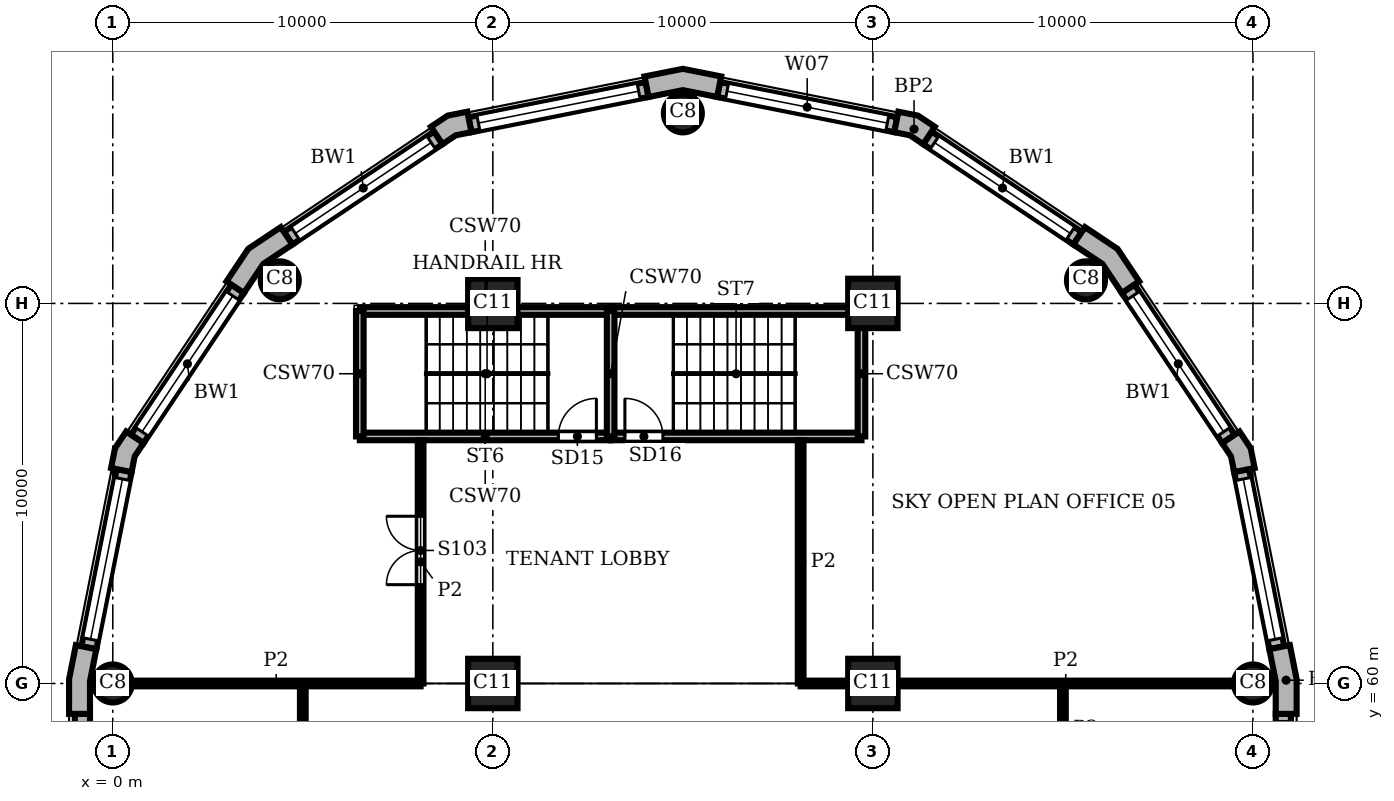
"""IFC4 building model, lengths in metres.
Left out: names, types, materials, properties, quantities, classifications, styles, units other than length and angle.
Written with IfcOpenShell. Run it as: python <this file> out.ifc"""

import sys

from ifc_helpers import new_model, si_unit, direction, frame, frame_2d, origin, origin_2d, place, context, subcontext, project, spatial, polyline, rectangle, circle, outline, extrude, element, fill, save


model = new_model("IFC4")
c1 = context("Model", 3, precision=1e-05, world=origin(), true_north=direction((0.0, 1.0)))
c2 = subcontext(c1, "Body", "Model", "MODEL_VIEW")
j1 = project(units=[si_unit("LENGTHUNIT", "METRE"), si_unit("PLANEANGLEUNIT", "RADIAN")], contexts=[c1])
p1 = place(None, origin())
s1 = spatial("IfcSite", under=j1, at=p1, CompositionType="ELEMENT")
p2 = place(p1, origin())
s2 = spatial("IfcBuilding", under=s1, at=p2, CompositionType="ELEMENT")
p3 = place(p2, frame((0.0, 0.0, 126.3)))
s3 = spatial("IfcBuildingStorey", under=s2, at=p3, CompositionType="ELEMENT", Elevation=126.3)
for number, where, z_axis, x_axis in (
    (1, (30.0, 60.0, 0.0), (0.0, 0.0, 1.0), (1.0, 0.0, 0.0)),
    (2, (25.607, 70.607, 0.0), (0.0, 0.0, 1.0), (1.0, 0.0, 0.0)),
    (3, (15.0, 75.0, 0.0), (0.0, 0.0, 1.0), (1.0, 0.0, 0.0)),
    (4, (4.393, 70.607, 0.0), (0.0, 0.0, 1.0), (1.0, 0.0, 0.0)),
    (5, (0.0, 60.0, 0.0), (0.0, 0.0, 1.0), (1.0, 0.0, 0.0)),
):
    element("IfcColumn", number, at=place(p3, frame(where, z_axis=z_axis, x_axis=x_axis)), inside=s3, PredefinedType="COLUMN", context=c2, shape_type="SweptSolid", body=[
        extrude(circle(Radius=0.5, at=origin_2d()), origin(), (0.0, 0.0, 1.0), 5.4),
    ])
for number, where, z_axis, x_axis in (
    (6, (10.0, 60.0, 0.0), (0.0, 0.0, 1.0), (1.0, 0.0, 0.0)),
    (7, (10.0, 70.0, 0.0), (0.0, 0.0, 1.0), (1.0, 0.0, 0.0)),
    (8, (20.0, 60.0, 0.0), (0.0, 0.0, 1.0), (1.0, 0.0, 0.0)),
    (9, (20.0, 70.0, 0.0), (0.0, 0.0, 1.0), (1.0, 0.0, 0.0)),
):
    element("IfcColumn", number, at=place(p3, frame(where, z_axis=z_axis, x_axis=x_axis)), inside=s3, PredefinedType="COLUMN", context=c2, shape_type="SweptSolid", body=[
        extrude(rectangle(XDim=1.3, YDim=1.3, at=origin_2d()), origin(), (0.0, 0.0, 1.0), 5.4),
    ])
p4 = place(p3, origin())
e10 = element("IfcWall", 10, at=p4, inside=s3, PredefinedType="SOLIDWALL", context=c2, shape_type="SweptSolid", body=[
    extrude(outline(polyline([(31.0, 59.2), (31.15, 59.2), (31.15, 60.113), (30.972, 61.009), (30.825, 60.98), (30.432, 60.902), (30.6, 60.059), (30.6, 59.2), (31.0, 59.2)])), origin(), (0.0, 0.0, 1.0), 5.4),
])
e11 = element("IfcWall", 11, at=p4, inside=s3, PredefinedType="SOLIDWALL", context=c2, shape_type="SweptSolid", body=[
    extrude(outline(polyline([(29.897, 65.641), (30.045, 65.67), (29.941, 66.189), (29.648, 66.629), (29.523, 66.545), (29.19, 66.323), (29.423, 65.974), (29.505, 65.563), (29.897, 65.641)])), origin(), (0.0, 0.0, 1.0), 5.4),
])
e12 = element("IfcWall", 12, at=p4, inside=s3, PredefinedType="SOLIDWALL", context=c2, shape_type="SweptSolid", body=[
    extrude(outline(polyline([(26.883, 70.497), (27.007, 70.58), (26.436, 71.436), (25.58, 72.007), (25.497, 71.883), (25.275, 71.55), (26.039, 71.039), (26.55, 70.275), (26.883, 70.497)])), origin(), (0.0, 0.0, 1.0), 5.4),
])
e13 = element("IfcWall", 13, at=p4, inside=s3, PredefinedType="SOLIDWALL", context=c2, shape_type="SweptSolid", body=[
    extrude(outline(polyline([(21.545, 74.523), (21.629, 74.648), (21.189, 74.941), (20.67, 75.045), (20.641, 74.897), (20.563, 74.505), (20.974, 74.423), (21.323, 74.19), (21.545, 74.523)])), origin(), (0.0, 0.0, 1.0), 5.4),
])
e14 = element("IfcWall", 14, at=p4, inside=s3, PredefinedType="SOLIDWALL", context=c2, shape_type="SweptSolid", body=[
    extrude(outline(polyline([(15.98, 75.825), (16.009, 75.972), (15.0, 76.173), (13.991, 75.972), (14.02, 75.825), (14.098, 75.432), (15.0, 75.612), (15.902, 75.432), (15.98, 75.825)])), origin(), (0.0, 0.0, 1.0), 5.4),
])
e15 = element("IfcWall", 15, at=p4, inside=s3, PredefinedType="SOLIDWALL", context=c2, shape_type="SweptSolid", body=[
    extrude(outline(polyline([(9.359, 74.897), (9.33, 75.045), (8.811, 74.941), (8.371, 74.648), (8.455, 74.523), (8.677, 74.19), (9.026, 74.423), (9.437, 74.505), (9.359, 74.897)])), origin(), (0.0, 0.0, 1.0), 5.4),
])
e16 = element("IfcWall", 16, at=p4, inside=s3, PredefinedType="SOLIDWALL", context=c2, shape_type="SweptSolid", body=[
    extrude(outline(polyline([(4.503, 71.883), (4.42, 72.007), (3.564, 71.436), (2.993, 70.58), (3.117, 70.497), (3.45, 70.275), (3.961, 71.039), (4.725, 71.55), (4.503, 71.883)])), origin(), (0.0, 0.0, 1.0), 5.4),
])
e17 = element("IfcWall", 17, at=p4, inside=s3, PredefinedType="SOLIDWALL", context=c2, shape_type="SweptSolid", body=[
    extrude(outline(polyline([(0.477, 66.545), (0.352, 66.629), (0.059, 66.189), (-0.045, 65.67), (0.103, 65.641), (0.495, 65.563), (0.577, 65.974), (0.81, 66.323), (0.477, 66.545)])), origin(), (0.0, 0.0, 1.0), 5.4),
])
e18 = element("IfcWall", 18, at=p4, inside=s3, PredefinedType="SOLIDWALL", context=c2, shape_type="SweptSolid", body=[
    extrude(outline(polyline([(-0.825, 60.98), (-0.972, 61.009), (-1.15, 60.113), (-1.15, 59.2), (-1.0, 59.2), (-0.6, 59.2), (-0.6, 60.059), (-0.432, 60.902), (-0.825, 60.98)])), origin(), (0.0, 0.0, 1.0), 5.4),
])
p5 = place(p3, frame((30.8, 40.8, 0.0), z_axis=(0.0, 0.0, 1.0), x_axis=(0.0, 1.0, 0.0)))
e19 = element("IfcWall", 19, at=p5, inside=s3, PredefinedType="SOLIDWALL", context=c2, shape_type="SweptSolid", body=[
    extrude(rectangle(XDim=18.4, YDim=0.4, at=frame_2d((9.2, 0.0))), origin(), (0.0, 0.0, 1.0), 5.4),
])
p6 = place(p5, frame((0.2, 0.0, 0.9)))
e20 = element("IfcOpeningElement", 20, at=p6, cuts=e19, PredefinedType="OPENING", context=c2, shape_type="SweptSolid", body=[
    extrude(rectangle(XDim=8.0, YDim=3.4, at=frame_2d((4.0, 1.7))), frame((0.0, 0.21, 0.0), z_axis=(0.0, -1.0, 0.0), x_axis=(1.0, 0.0, 0.0)), (0.0, 0.0, 1.0), 0.42),
])
p7 = place(p5, frame((10.2, 0.0, 0.9)))
e21 = element("IfcOpeningElement", 21, at=p7, cuts=e19, PredefinedType="OPENING", context=c2, shape_type="SweptSolid", body=[
    extrude(rectangle(XDim=8.0, YDim=3.4, at=frame_2d((4.0, 1.7))), frame((0.0, 0.21, 0.0), z_axis=(0.0, -1.0, 0.0), x_axis=(1.0, 0.0, 0.0)), (0.0, 0.0, 1.0), 0.42),
])
p8 = place(p3, frame((30.629, 60.941, 0.0), z_axis=(0.0, 0.0, 1.0), x_axis=(-0.195098533057, 0.98078364709, 0.0)))
e22 = element("IfcWall", 22, at=p8, inside=s3, PredefinedType="SOLIDWALL", context=c2, shape_type="SweptSolid", body=[
    extrude(rectangle(XDim=4.753, YDim=0.4, at=frame_2d((2.376, 0.0))), origin(), (0.0, 0.0, 1.0), 5.4),
])
p9 = place(p8, frame((0.226, 0.0, 0.9)))
e23 = element("IfcOpeningElement", 23, at=p9, cuts=e22, PredefinedType="OPENING", context=c2, shape_type="SweptSolid", body=[
    extrude(rectangle(XDim=4.3, YDim=3.4, at=frame_2d((2.15, 1.7))), frame((0.0, 0.21, 0.0), z_axis=(0.0, -1.0, 0.0), x_axis=(1.0, 0.0, 0.0)), (0.0, 0.0, 1.0), 0.42),
])
p10 = place(p3, frame((29.357, 66.434, 0.0), z_axis=(0.0, 0.0, 1.0), x_axis=(-0.555541552266, 0.831488775454, 0.0)))
e24 = element("IfcWall", 24, at=p10, inside=s3, PredefinedType="SOLIDWALL", context=c2, shape_type="SweptSolid", body=[
    extrude(rectangle(XDim=4.753, YDim=0.4, at=frame_2d((2.376, 0.0))), origin(), (0.0, 0.0, 1.0), 5.4),
])
p11 = place(p10, frame((0.226, 0.0, 0.9)))
e25 = element("IfcOpeningElement", 25, at=p11, cuts=e24, PredefinedType="OPENING", context=c2, shape_type="SweptSolid", body=[
    extrude(rectangle(XDim=4.3, YDim=3.4, at=frame_2d((2.15, 1.7))), frame((0.0, 0.21, 0.0), z_axis=(0.0, -1.0, 0.0), x_axis=(1.0, 0.0, 0.0)), (0.0, 0.0, 1.0), 0.42),
])
p12 = place(p3, frame((25.386, 71.716, 0.0), z_axis=(0.0, 0.0, 1.0), x_axis=(-0.831488775454, 0.555541552266, 0.0)))
e26 = element("IfcWall", 26, at=p12, inside=s3, PredefinedType="SOLIDWALL", context=c2, shape_type="SweptSolid", body=[
    extrude(rectangle(XDim=4.753, YDim=0.4, at=frame_2d((2.376, 0.0))), origin(), (0.0, 0.0, 1.0), 5.4),
])
p13 = place(p12, frame((0.226, 0.0, 0.9)))
e27 = element("IfcOpeningElement", 27, at=p13, cuts=e26, PredefinedType="OPENING", context=c2, shape_type="SweptSolid", body=[
    extrude(rectangle(XDim=4.3, YDim=3.4, at=frame_2d((2.15, 1.7))), frame((0.0, 0.21, 0.0), z_axis=(0.0, -1.0, 0.0), x_axis=(1.0, 0.0, 0.0)), (0.0, 0.0, 1.0), 0.42),
])
p14 = place(p3, frame((20.602, 74.701, 0.0), z_axis=(0.0, 0.0, 1.0), x_axis=(-0.98078364709, 0.195098533057, 0.0)))
e28 = element("IfcWall", 28, at=p14, inside=s3, PredefinedType="SOLIDWALL", context=c2, shape_type="SweptSolid", body=[
    extrude(rectangle(XDim=4.753, YDim=0.4, at=frame_2d((2.376, 0.0))), origin(), (0.0, 0.0, 1.0), 5.4),
])
p15 = place(p14, frame((0.226, 0.0, 0.9)))
e29 = element("IfcOpeningElement", 29, at=p15, cuts=e28, PredefinedType="OPENING", context=c2, shape_type="SweptSolid", body=[
    extrude(rectangle(XDim=4.3, YDim=3.4, at=frame_2d((2.15, 1.7))), frame((0.0, 0.21, 0.0), z_axis=(0.0, -1.0, 0.0), x_axis=(1.0, 0.0, 0.0)), (0.0, 0.0, 1.0), 0.42),
])
p16 = place(p3, frame((14.059, 75.629, 0.0), z_axis=(0.0, 0.0, 1.0), x_axis=(-0.98078364709, -0.195098533057, 0.0)))
e30 = element("IfcWall", 30, at=p16, inside=s3, PredefinedType="SOLIDWALL", context=c2, shape_type="SweptSolid", body=[
    extrude(rectangle(XDim=4.753, YDim=0.4, at=frame_2d((2.376, 0.0))), origin(), (0.0, 0.0, 1.0), 5.4),
])
p17 = place(p16, frame((0.226, 0.0, 0.9)))
e31 = element("IfcOpeningElement", 31, at=p17, cuts=e30, PredefinedType="OPENING", context=c2, shape_type="SweptSolid", body=[
    extrude(rectangle(XDim=4.3, YDim=3.4, at=frame_2d((2.15, 1.7))), frame((0.0, 0.21, 0.0), z_axis=(0.0, -1.0, 0.0), x_axis=(1.0, 0.0, 0.0)), (0.0, 0.0, 1.0), 0.42),
])
p18 = place(p3, frame((8.566, 74.357, 0.0), z_axis=(0.0, 0.0, 1.0), x_axis=(-0.831488775454, -0.555541552266, 0.0)))
e32 = element("IfcWall", 32, at=p18, inside=s3, PredefinedType="SOLIDWALL", context=c2, shape_type="SweptSolid", body=[
    extrude(rectangle(XDim=4.753, YDim=0.4, at=frame_2d((2.376, 0.0))), origin(), (0.0, 0.0, 1.0), 5.4),
])
p19 = place(p18, frame((0.226, 0.0, 0.9)))
e33 = element("IfcOpeningElement", 33, at=p19, cuts=e32, PredefinedType="OPENING", context=c2, shape_type="SweptSolid", body=[
    extrude(rectangle(XDim=4.3, YDim=3.4, at=frame_2d((2.15, 1.7))), frame((0.0, 0.21, 0.0), z_axis=(0.0, -1.0, 0.0), x_axis=(1.0, 0.0, 0.0)), (0.0, 0.0, 1.0), 0.42),
])
p20 = place(p3, frame((3.284, 70.386, 0.0), z_axis=(0.0, 0.0, 1.0), x_axis=(-0.555541552266, -0.831488775454, 0.0)))
e34 = element("IfcWall", 34, at=p20, inside=s3, PredefinedType="SOLIDWALL", context=c2, shape_type="SweptSolid", body=[
    extrude(rectangle(XDim=4.753, YDim=0.4, at=frame_2d((2.376, 0.0))), origin(), (0.0, 0.0, 1.0), 5.4),
])
p21 = place(p20, frame((0.226, 0.0, 0.9)))
e35 = element("IfcOpeningElement", 35, at=p21, cuts=e34, PredefinedType="OPENING", context=c2, shape_type="SweptSolid", body=[
    extrude(rectangle(XDim=4.3, YDim=3.4, at=frame_2d((2.15, 1.7))), frame((0.0, 0.21, 0.0), z_axis=(0.0, -1.0, 0.0), x_axis=(1.0, 0.0, 0.0)), (0.0, 0.0, 1.0), 0.42),
])
p22 = place(p3, frame((0.299, 65.602, 0.0), z_axis=(0.0, 0.0, 1.0), x_axis=(-0.195098533057, -0.98078364709, 0.0)))
e36 = element("IfcWall", 36, at=p22, inside=s3, PredefinedType="SOLIDWALL", context=c2, shape_type="SweptSolid", body=[
    extrude(rectangle(XDim=4.753, YDim=0.4, at=frame_2d((2.376, 0.0))), origin(), (0.0, 0.0, 1.0), 5.4),
])
p23 = place(p22, frame((0.226, 0.0, 0.9)))
e37 = element("IfcOpeningElement", 37, at=p23, cuts=e36, PredefinedType="OPENING", context=c2, shape_type="SweptSolid", body=[
    extrude(rectangle(XDim=4.3, YDim=3.4, at=frame_2d((2.15, 1.7))), frame((0.0, 0.21, 0.0), z_axis=(0.0, -1.0, 0.0), x_axis=(1.0, 0.0, 0.0)), (0.0, 0.0, 1.0), 0.42),
])
p24 = place(p3, frame((-0.8, 59.2, 0.0), z_axis=(0.0, 0.0, 1.0), x_axis=(0.0, -1.0, 0.0)))
e38 = element("IfcWall", 38, at=p24, inside=s3, PredefinedType="SOLIDWALL", context=c2, shape_type="SweptSolid", body=[
    extrude(rectangle(XDim=18.4, YDim=0.4, at=frame_2d((9.2, 0.0))), origin(), (0.0, 0.0, 1.0), 5.4),
])
p25 = place(p24, frame((3.75, 0.0, 0.9)))
e39 = element("IfcOpeningElement", 39, at=p25, cuts=e38, PredefinedType="OPENING", context=c2, shape_type="SweptSolid", body=[
    extrude(rectangle(XDim=0.9, YDim=3.4, at=frame_2d((0.45, 1.7))), frame((0.0, 0.21, 0.0), z_axis=(0.0, -1.0, 0.0), x_axis=(1.0, 0.0, 0.0)), (0.0, 0.0, 1.0), 0.42),
])
p26 = place(p24, frame((13.75, 0.0, 0.9)))
e40 = element("IfcOpeningElement", 40, at=p26, cuts=e38, PredefinedType="OPENING", context=c2, shape_type="SweptSolid", body=[
    extrude(rectangle(XDim=0.9, YDim=3.4, at=frame_2d((0.45, 1.7))), frame((0.0, 0.21, 0.0), z_axis=(0.0, -1.0, 0.0), x_axis=(1.0, 0.0, 0.0)), (0.0, 0.0, 1.0), 0.42),
])
p27 = place(p3, frame((6.5, 66.5, 0.0), z_axis=(0.0, 0.0, 1.0), x_axis=(1.0, 0.0, 0.0)))
e41 = element("IfcWall", 41, at=p27, inside=s3, PredefinedType="SHEAR", context=c2, shape_type="SweptSolid", body=[
    extrude(rectangle(XDim=6.6, YDim=0.2, at=frame_2d((3.3, 0.0))), origin(), (0.0, 0.0, 1.0), 5.08),
])
p28 = place(p27, frame((5.225, 0.0, 0.0)))
e42 = element("IfcOpeningElement", 42, at=p28, cuts=e41, PredefinedType="OPENING", context=c2, shape_type="SweptSolid", body=[
    extrude(rectangle(XDim=1.0, YDim=2.1, at=frame_2d((0.5, 1.05))), frame((0.0, 0.11, 0.0), z_axis=(0.0, -1.0, 0.0), x_axis=(1.0, 0.0, 0.0)), (0.0, 0.0, 1.0), 0.22),
])
p29 = place(p3, frame((13.1, 66.5, 0.0), z_axis=(0.0, 0.0, 1.0), x_axis=(1.0, 0.0, 0.0)))
e43 = element("IfcWall", 43, at=p29, inside=s3, PredefinedType="SHEAR", context=c2, shape_type="SweptSolid", body=[
    extrude(rectangle(XDim=6.6, YDim=0.2, at=frame_2d((3.3, 0.0))), origin(), (0.0, 0.0, 1.0), 5.08),
])
p30 = place(p29, frame((0.375, 0.0, 0.0)))
e44 = element("IfcOpeningElement", 44, at=p30, cuts=e43, PredefinedType="OPENING", context=c2, shape_type="SweptSolid", body=[
    extrude(rectangle(XDim=1.0, YDim=2.1, at=frame_2d((0.5, 1.05))), frame((0.0, 0.11, 0.0), z_axis=(0.0, -1.0, 0.0), x_axis=(1.0, 0.0, 0.0)), (0.0, 0.0, 1.0), 0.22),
])
p31 = place(p3, frame((6.5, 69.8, 0.0), z_axis=(0.0, 0.0, 1.0), x_axis=(1.0, 0.0, 0.0)))
e45 = element("IfcWall", 45, at=p31, inside=s3, PredefinedType="SHEAR", context=c2, shape_type="SweptSolid", body=[
    extrude(rectangle(XDim=6.6, YDim=0.2, at=frame_2d((3.3, 0.0))), origin(), (0.0, 0.0, 1.0), 5.08),
])
p32 = place(p3, frame((13.1, 69.8, 0.0), z_axis=(0.0, 0.0, 1.0), x_axis=(1.0, 0.0, 0.0)))
e46 = element("IfcWall", 46, at=p32, inside=s3, PredefinedType="SHEAR", context=c2, shape_type="SweptSolid", body=[
    extrude(rectangle(XDim=6.6, YDim=0.2, at=frame_2d((3.3, 0.0))), origin(), (0.0, 0.0, 1.0), 5.08),
])
for number, where, z_axis, x_axis in (
    (47, (6.5, 66.5, 0.0), (0.0, 0.0, 1.0), (0.0, 1.0, 0.0)),
    (48, (13.1, 66.5, 0.0), (0.0, 0.0, 1.0), (0.0, 1.0, 0.0)),
    (49, (19.7, 66.5, 0.0), (0.0, 0.0, 1.0), (0.0, 1.0, 0.0)),
):
    element("IfcWall", number, at=place(p3, frame(where, z_axis=z_axis, x_axis=x_axis)), inside=s3, PredefinedType="SHEAR", context=c2, shape_type="SweptSolid", body=[
        extrude(rectangle(XDim=3.3, YDim=0.2, at=frame_2d((1.65, 0.0))), origin(), (0.0, 0.0, 1.0), 5.08),
    ])
p33 = place(p3, frame((5.0, 57.6, 0.0), z_axis=(0.0, 0.0, 1.0), x_axis=(0.0, 1.0, 0.0)))
e50 = element("IfcWall", 50, at=p33, inside=s3, PredefinedType="PARTITIONING", context=c2, shape_type="SweptSolid", body=[
    extrude(rectangle(XDim=2.4, YDim=0.15, at=frame_2d((1.2, 0.0))), origin(), (0.0, 0.0, 1.0), 5.08),
])
p34 = place(p3, frame((8.1, 60.0, 0.0), z_axis=(0.0, 0.0, 1.0), x_axis=(0.0, 1.0, 0.0)))
e51 = element("IfcWall", 51, at=p34, inside=s3, PredefinedType="PARTITIONING", context=c2, shape_type="SweptSolid", body=[
    extrude(rectangle(XDim=6.4, YDim=0.15, at=frame_2d((3.2, 0.0))), origin(), (0.0, 0.0, 1.0), 5.08),
])
p35 = place(p34, frame((2.6, 0.0, 0.0)))
e52 = element("IfcOpeningElement", 52, at=p35, cuts=e51, PredefinedType="OPENING", context=c2, shape_type="SweptSolid", body=[
    extrude(rectangle(XDim=1.8, YDim=2.1, at=frame_2d((0.9, 1.05))), frame((0.0, 0.085, 0.0), z_axis=(0.0, -1.0, 0.0), x_axis=(1.0, 0.0, 0.0)), (0.0, 0.0, 1.0), 0.17),
])
p36 = place(p3, frame((18.1, 60.0, 0.0), z_axis=(0.0, 0.0, 1.0), x_axis=(0.0, 1.0, 0.0)))
e53 = element("IfcWall", 53, at=p36, inside=s3, PredefinedType="PARTITIONING", context=c2, shape_type="SweptSolid", body=[
    extrude(rectangle(XDim=6.4, YDim=0.15, at=frame_2d((3.2, 0.0))), origin(), (0.0, 0.0, 1.0), 5.08),
])
p37 = place(p3, frame((25.0, 57.6, 0.0), z_axis=(0.0, 0.0, 1.0), x_axis=(0.0, 1.0, 0.0)))
e54 = element("IfcWall", 54, at=p37, inside=s3, PredefinedType="PARTITIONING", context=c2, shape_type="SweptSolid", body=[
    extrude(rectangle(XDim=2.4, YDim=0.15, at=frame_2d((1.2, 0.0))), origin(), (0.0, 0.0, 1.0), 5.08),
])
p38 = place(p3, frame((0.5, 60.0, 0.0), z_axis=(0.0, 0.0, 1.0), x_axis=(1.0, 0.0, 0.0)))
e55 = element("IfcWall", 55, at=p38, inside=s3, PredefinedType="PARTITIONING", context=c2, shape_type="SweptSolid", body=[
    extrude(rectangle(XDim=7.6, YDim=0.15, at=frame_2d((3.8, 0.0))), origin(), (0.0, 0.0, 1.0), 5.08),
])
p39 = place(p3, frame((18.1, 60.0, 0.0), z_axis=(0.0, 0.0, 1.0), x_axis=(1.0, 0.0, 0.0)))
e56 = element("IfcWall", 56, at=p39, inside=s3, PredefinedType="PARTITIONING", context=c2, shape_type="SweptSolid", body=[
    extrude(rectangle(XDim=1.25, YDim=0.15, at=frame_2d((0.625, 0.0))), origin(), (0.0, 0.0, 1.0), 5.08),
])
p40 = place(p3, frame((20.65, 60.0, 0.0), z_axis=(0.0, 0.0, 1.0), x_axis=(1.0, 0.0, 0.0)))
e57 = element("IfcWall", 57, at=p40, inside=s3, PredefinedType="PARTITIONING", context=c2, shape_type="SweptSolid", body=[
    extrude(rectangle(XDim=8.85, YDim=0.15, at=frame_2d((4.425, 0.0))), origin(), (0.0, 0.0, 1.0), 5.08),
])
p41 = place(p9, origin())
e58 = element("IfcWindow", 58, at=p41, inside=s3, PartitioningType="SINGLE_PANEL", PredefinedType="WINDOW", context=c2, shape_type="SweptSolid", body=[
    extrude(rectangle(XDim=4.3, YDim=3.4, at=frame_2d((2.15, 1.7))), frame((0.0, 0.16, 0.0), z_axis=(0.0, -1.0, 0.0), x_axis=(1.0, 0.0, 0.0)), (0.0, 0.0, 1.0), 0.06),
])
fill(e23, e58)
p42 = place(p11, origin())
e59 = element("IfcWindow", 59, at=p42, inside=s3, PartitioningType="SINGLE_PANEL", PredefinedType="WINDOW", context=c2, shape_type="SweptSolid", body=[
    extrude(rectangle(XDim=4.3, YDim=3.4, at=frame_2d((2.15, 1.7))), frame((0.0, 0.16, 0.0), z_axis=(0.0, -1.0, 0.0), x_axis=(1.0, 0.0, 0.0)), (0.0, 0.0, 1.0), 0.06),
])
fill(e25, e59)
p43 = place(p13, origin())
e60 = element("IfcWindow", 60, at=p43, inside=s3, PartitioningType="SINGLE_PANEL", PredefinedType="WINDOW", context=c2, shape_type="SweptSolid", body=[
    extrude(rectangle(XDim=4.3, YDim=3.4, at=frame_2d((2.15, 1.7))), frame((0.0, 0.16, 0.0), z_axis=(0.0, -1.0, 0.0), x_axis=(1.0, 0.0, 0.0)), (0.0, 0.0, 1.0), 0.06),
])
fill(e27, e60)
p44 = place(p15, origin())
e61 = element("IfcWindow", 61, at=p44, inside=s3, PartitioningType="SINGLE_PANEL", PredefinedType="WINDOW", context=c2, shape_type="SweptSolid", body=[
    extrude(rectangle(XDim=4.3, YDim=3.4, at=frame_2d((2.15, 1.7))), frame((0.0, 0.16, 0.0), z_axis=(0.0, -1.0, 0.0), x_axis=(1.0, 0.0, 0.0)), (0.0, 0.0, 1.0), 0.06),
])
fill(e29, e61)
p45 = place(p17, origin())
e62 = element("IfcWindow", 62, at=p45, inside=s3, PartitioningType="SINGLE_PANEL", PredefinedType="WINDOW", context=c2, shape_type="SweptSolid", body=[
    extrude(rectangle(XDim=4.3, YDim=3.4, at=frame_2d((2.15, 1.7))), frame((0.0, 0.16, 0.0), z_axis=(0.0, -1.0, 0.0), x_axis=(1.0, 0.0, 0.0)), (0.0, 0.0, 1.0), 0.06),
])
fill(e31, e62)
p46 = place(p19, origin())
e63 = element("IfcWindow", 63, at=p46, inside=s3, PartitioningType="SINGLE_PANEL", PredefinedType="WINDOW", context=c2, shape_type="SweptSolid", body=[
    extrude(rectangle(XDim=4.3, YDim=3.4, at=frame_2d((2.15, 1.7))), frame((0.0, 0.16, 0.0), z_axis=(0.0, -1.0, 0.0), x_axis=(1.0, 0.0, 0.0)), (0.0, 0.0, 1.0), 0.06),
])
fill(e33, e63)
p47 = place(p21, origin())
e64 = element("IfcWindow", 64, at=p47, inside=s3, PartitioningType="SINGLE_PANEL", PredefinedType="WINDOW", context=c2, shape_type="SweptSolid", body=[
    extrude(rectangle(XDim=4.3, YDim=3.4, at=frame_2d((2.15, 1.7))), frame((0.0, 0.16, 0.0), z_axis=(0.0, -1.0, 0.0), x_axis=(1.0, 0.0, 0.0)), (0.0, 0.0, 1.0), 0.06),
])
fill(e35, e64)
p48 = place(p23, origin())
e65 = element("IfcWindow", 65, at=p48, inside=s3, PartitioningType="SINGLE_PANEL", PredefinedType="WINDOW", context=c2, shape_type="SweptSolid", body=[
    extrude(rectangle(XDim=4.3, YDim=3.4, at=frame_2d((2.15, 1.7))), frame((0.0, 0.16, 0.0), z_axis=(0.0, -1.0, 0.0), x_axis=(1.0, 0.0, 0.0)), (0.0, 0.0, 1.0), 0.06),
])
fill(e37, e65)
p49 = place(p28, origin())
e66 = element("IfcDoor", 66, at=p49, inside=s3, OperationType="SINGLE_SWING_RIGHT", PredefinedType="DOOR", context=c2, shape_type="SweptSolid", body=[
    extrude(rectangle(XDim=1.0, YDim=2.1, at=frame_2d((0.5, 1.05))), frame((0.0, 0.025, 0.0), z_axis=(0.0, -1.0, 0.0), x_axis=(1.0, 0.0, 0.0)), (0.0, 0.0, 1.0), 0.05),
])
fill(e42, e66)
p50 = place(p30, origin())
e67 = element("IfcDoor", 67, at=p50, inside=s3, OperationType="SINGLE_SWING_LEFT", PredefinedType="DOOR", context=c2, shape_type="SweptSolid", body=[
    extrude(rectangle(XDim=1.0, YDim=2.1, at=frame_2d((0.5, 1.05))), frame((0.0, 0.025, 0.0), z_axis=(0.0, -1.0, 0.0), x_axis=(1.0, 0.0, 0.0)), (0.0, 0.0, 1.0), 0.05),
])
fill(e44, e67)
p51 = place(p35, origin())
e68 = element("IfcDoor", 68, at=p51, inside=s3, OperationType="DOUBLE_DOOR_SINGLE_SWING", PredefinedType="DOOR", context=c2, shape_type="SweptSolid", body=[
    extrude(rectangle(XDim=1.8, YDim=2.1, at=frame_2d((0.9, 1.05))), frame((0.0, 0.025, 0.0), z_axis=(0.0, -1.0, 0.0), x_axis=(1.0, 0.0, 0.0)), (0.0, 0.0, 1.0), 0.05),
])
fill(e52, e68)
save(model, sys.argv[1])
